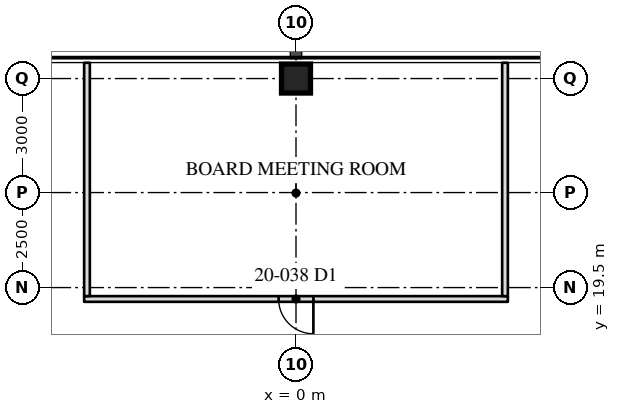
"""IFC4 building model, lengths in metres.
Left out: names, types, materials, properties, quantities, classifications, styles, units other than length and angle.
Written with IfcOpenShell. Run it as: python <this file> out.ifc"""

import sys

from ifc_helpers import new_model, si_unit, direction, frame, frame_2d, origin, origin_2d, place, context, subcontext, project, spatial, rectangle, hollow_rectangle, extrude, element, fill, save


model = new_model("IFC4")
c1 = context("Model", 3, precision=1e-05, world=origin(), true_north=direction((0.0, 1.0)))
c2 = subcontext(c1, "Body", "Model", "MODEL_VIEW")
j1 = project(units=[si_unit("LENGTHUNIT", "METRE"), si_unit("PLANEANGLEUNIT", "RADIAN")], contexts=[c1])
p1 = place(None, origin())
s1 = spatial("IfcSite", under=j1, at=p1, CompositionType="ELEMENT")
p2 = place(p1, origin())
s2 = spatial("IfcBuilding", under=s1, at=p2, CompositionType="ELEMENT")
p3 = place(p2, frame((0.0, 0.0, 85.7)))
s3 = spatial("IfcBuildingStorey", under=s2, at=p3, CompositionType="ELEMENT", Elevation=85.7)
p4 = place(p3, frame((0.0, 25.0, 0.0), z_axis=(0.0, 0.0, 1.0), x_axis=(1.0, 0.0, 0.0)))
e1 = element("IfcColumn", 1, at=p4, inside=s3, PredefinedType="COLUMN", context=c2, shape_type="SweptSolid", body=[
    extrude(hollow_rectangle(XDim=0.762, YDim=0.762, WallThickness=0.127, at=origin_2d()), origin(), (0.0, 0.0, 1.0), 4.1),
])
p5 = place(p3, frame((5.575, 19.2, 0.0), z_axis=(0.0, 0.0, 1.0), x_axis=(-1.0, 0.0, 0.0)))
e2 = element("IfcWall", 2, at=p5, inside=s3, PredefinedType="PARTITIONING", context=c2, shape_type="SweptSolid", body=[
    extrude(rectangle(XDim=11.15, YDim=0.15, at=frame_2d((5.575, 0.0))), origin(), (0.0, 0.0, 1.0), 3.91),
])
p6 = place(p5, frame((5.117, 0.0, 0.0)))
e3 = element("IfcOpeningElement", 3, at=p6, cuts=e2, PredefinedType="OPENING", context=c2, shape_type="SweptSolid", body=[
    extrude(rectangle(XDim=0.915, YDim=2.134, at=frame_2d((0.458, 1.067))), frame((0.0, 0.085, 0.0), z_axis=(0.0, -1.0, 0.0), x_axis=(1.0, 0.0, 0.0)), (0.0, 0.0, 1.0), 0.17),
])
for number, where, z_axis, x_axis in (
    (4, (5.5, 19.275, 0.0), (0.0, 0.0, 1.0), (0.0, 1.0, 0.0)),
    (5, (-5.5, 19.275, 0.0), (0.0, 0.0, 1.0), (0.0, 1.0, 0.0)),
):
    element("IfcWall", number, at=place(p3, frame(where, z_axis=z_axis, x_axis=x_axis)), inside=s3, PredefinedType="PARTITIONING", context=c2, shape_type="SweptSolid", body=[
        extrude(rectangle(XDim=6.14, YDim=0.15, at=frame_2d((3.07, 0.0))), origin(), (0.0, 0.0, 1.0), 3.91),
    ])
p7 = place(p6, origin())
e6 = element("IfcDoor", 6, at=p7, inside=s3, OperationType="SINGLE_SWING_LEFT", PredefinedType="DOOR", context=c2, shape_type="SweptSolid", body=[
    extrude(rectangle(XDim=0.915, YDim=2.134, at=frame_2d((0.458, 1.067))), frame((0.0, 0.025, 0.0), z_axis=(0.0, -1.0, 0.0), x_axis=(1.0, 0.0, 0.0)), (0.0, 0.0, 1.0), 0.05),
])
fill(e3, e6)
save(model, sys.argv[1])
